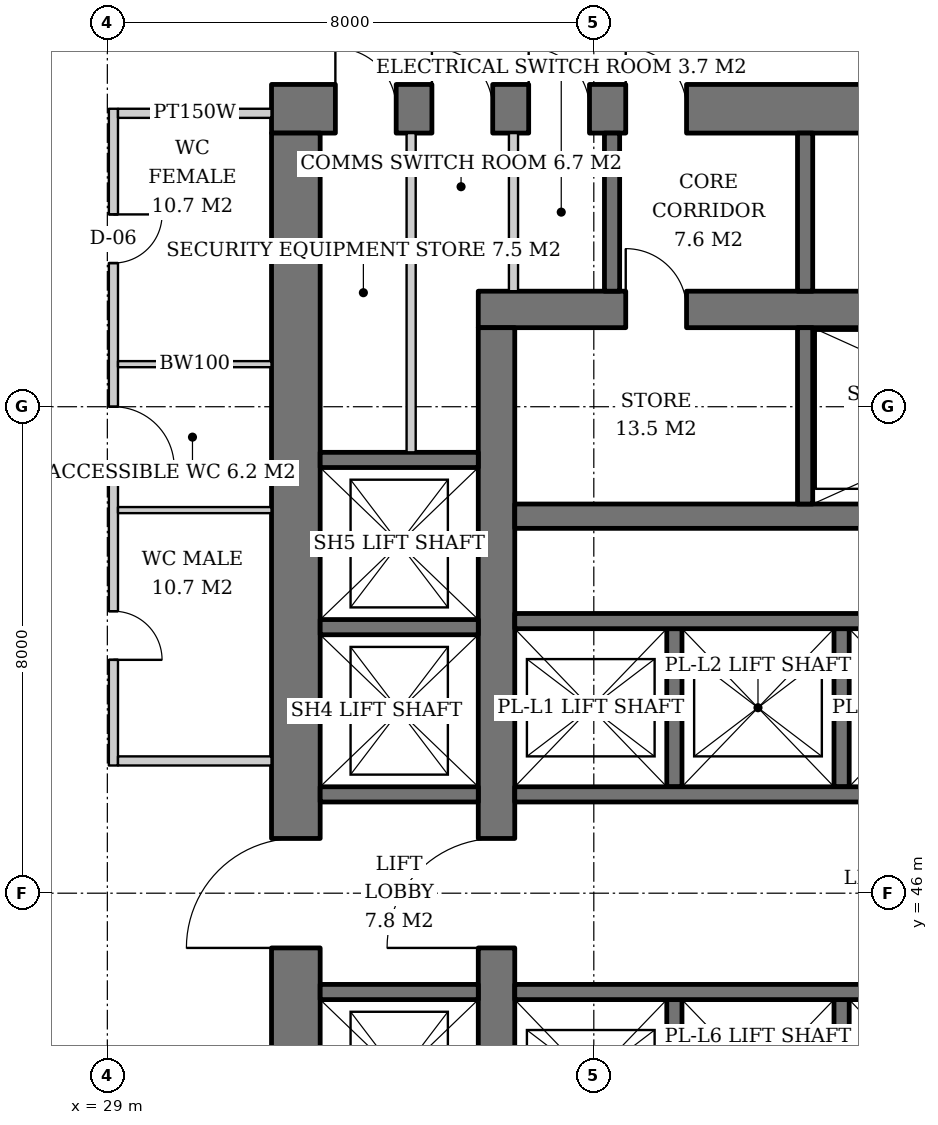
"""IFC4 building model, lengths in metres.
Left out: names, types, materials, properties, quantities, classifications, styles, units other than length and angle.
Written with IfcOpenShell. Run it as: python <this file> out.ifc"""

import sys

from ifc_helpers import new_model, si_unit, direction, frame, frame_2d, origin, place, context, subcontext, project, spatial, rectangle, extrude, element, fill, save


model = new_model("IFC4")
c1 = context("Model", 3, precision=1e-05, world=origin(), true_north=direction((0.0, 1.0)))
c2 = subcontext(c1, "Body", "Model", "MODEL_VIEW")
j1 = project(units=[si_unit("LENGTHUNIT", "METRE"), si_unit("PLANEANGLEUNIT", "RADIAN")], contexts=[c1])
p1 = place(None, origin())
s1 = spatial("IfcSite", under=j1, at=p1, CompositionType="ELEMENT")
p2 = place(p1, origin())
s2 = spatial("IfcBuilding", under=s1, at=p2, CompositionType="ELEMENT")
p3 = place(p2, frame((0.0, 0.0, 16.0)))
s3 = spatial("IfcBuildingStorey", under=s2, at=p3, CompositionType="ELEMENT", Elevation=16.0)
p4 = place(p3, frame((35.1, 55.6, 0.0), z_axis=(0.0, 0.0, 1.0), x_axis=(1.0, 0.0, 0.0)))
e1 = element("IfcWall", 1, at=p4, inside=s3, PredefinedType="SHEAR", context=c2, shape_type="SweptSolid", body=[
    extrude(rectangle(XDim=19.8, YDim=0.6, at=frame_2d((9.9, 0.0))), origin(), (0.0, 0.0, 1.0), 5.0),
])
p5 = place(p4, frame((14.54, 0.0, 0.0)))
e2 = element("IfcOpeningElement", 2, at=p5, cuts=e1, PredefinedType="OPENING", context=c2, shape_type="SweptSolid", body=[
    extrude(rectangle(XDim=1.0, YDim=2.1, at=frame_2d((0.5, 1.05))), frame((0.0, 0.31, 0.0), z_axis=(0.0, -1.0, 0.0), x_axis=(1.0, 0.0, 0.0)), (0.0, 0.0, 1.0), 0.62),
])
p6 = place(p4, frame((12.18, 0.0, 0.0)))
e3 = element("IfcOpeningElement", 3, at=p6, cuts=e1, PredefinedType="OPENING", context=c2, shape_type="SweptSolid", body=[
    extrude(rectangle(XDim=1.0, YDim=2.1, at=frame_2d((0.5, 1.05))), frame((0.0, 0.31, 0.0), z_axis=(0.0, -1.0, 0.0), x_axis=(1.0, 0.0, 0.0)), (0.0, 0.0, 1.0), 0.62),
])
p7 = place(p4, frame((2.425, 0.0, 0.0)))
e4 = element("IfcOpeningElement", 4, at=p7, cuts=e1, PredefinedType="OPENING", context=c2, shape_type="SweptSolid", body=[
    extrude(rectangle(XDim=1.0, YDim=2.1, at=frame_2d((0.5, 1.05))), frame((0.0, 0.31, 0.0), z_axis=(0.0, -1.0, 0.0), x_axis=(1.0, 0.0, 0.0)), (0.0, 0.0, 1.0), 0.62),
])
p8 = place(p3, frame((35.4, 36.7, 0.0), z_axis=(0.0, 0.0, 1.0), x_axis=(0.0, 1.0, 0.0)))
e5 = element("IfcWall", 5, at=p8, inside=s3, PredefinedType="SHEAR", context=c2, shape_type="SweptSolid", body=[
    extrude(rectangle(XDim=18.6, YDim=0.6, at=frame_2d((9.3, 0.0))), origin(), (0.0, 0.0, 1.0), 5.0),
])
p9 = place(p8, frame((8.4, 0.0, 0.0)))
e6 = element("IfcOpeningElement", 6, at=p9, cuts=e5, PredefinedType="OPENING", context=c2, shape_type="SweptSolid", body=[
    extrude(rectangle(XDim=1.8, YDim=2.4, at=frame_2d((0.9, 1.2))), frame((0.0, 0.31, 0.0), z_axis=(0.0, -1.0, 0.0), x_axis=(1.0, 0.0, 0.0)), (0.0, 0.0, 1.0), 0.62),
])
p10 = place(p3, frame((31.7, 58.9, 0.0), z_axis=(0.0, 0.0, 1.0), x_axis=(1.0, 0.0, 0.0)))
e7 = element("IfcWall", 7, at=p10, inside=s3, PredefinedType="SHEAR", context=c2, shape_type="SweptSolid", body=[
    extrude(rectangle(XDim=26.6, YDim=0.8, at=frame_2d((13.3, 0.0))), origin(), (0.0, 0.0, 1.0), 5.0),
])
p11 = place(p10, frame((17.94, 0.0, 0.0)))
e8 = element("IfcOpeningElement", 8, at=p11, cuts=e7, PredefinedType="OPENING", context=c2, shape_type="SweptSolid", body=[
    extrude(rectangle(XDim=1.0, YDim=2.1, at=frame_2d((0.5, 1.05))), frame((0.0, 0.41, 0.0), z_axis=(0.0, -1.0, 0.0), x_axis=(1.0, 0.0, 0.0)), (0.0, 0.0, 1.0), 0.82),
])
p12 = place(p10, frame((12.44, 0.0, 0.0)))
e9 = element("IfcOpeningElement", 9, at=p12, cuts=e7, PredefinedType="OPENING", context=c2, shape_type="SweptSolid", body=[
    extrude(rectangle(XDim=1.0, YDim=2.1, at=frame_2d((0.5, 1.05))), frame((0.0, 0.41, 0.0), z_axis=(0.0, -1.0, 0.0), x_axis=(1.0, 0.0, 0.0)), (0.0, 0.0, 1.0), 0.82),
])
p13 = place(p10, frame((5.825, 0.0, 0.0)))
e10 = element("IfcOpeningElement", 10, at=p13, cuts=e7, PredefinedType="OPENING", context=c2, shape_type="SweptSolid", body=[
    extrude(rectangle(XDim=1.0, YDim=2.1, at=frame_2d((0.5, 1.05))), frame((0.0, 0.41, 0.0), z_axis=(0.0, -1.0, 0.0), x_axis=(1.0, 0.0, 0.0)), (0.0, 0.0, 1.0), 0.82),
])
p14 = place(p10, frame((1.05, 0.0, 0.0)))
e11 = element("IfcOpeningElement", 11, at=p14, cuts=e7, PredefinedType="OPENING", context=c2, shape_type="SweptSolid", body=[
    extrude(rectangle(XDim=1.0, YDim=2.1, at=frame_2d((0.5, 1.05))), frame((0.0, 0.41, 0.0), z_axis=(0.0, -1.0, 0.0), x_axis=(1.0, 0.0, 0.0)), (0.0, 0.0, 1.0), 0.82),
])
p15 = place(p10, frame((2.637, 0.0, 0.0)))
e12 = element("IfcOpeningElement", 12, at=p15, cuts=e7, PredefinedType="OPENING", context=c2, shape_type="SweptSolid", body=[
    extrude(rectangle(XDim=1.0, YDim=2.1, at=frame_2d((0.5, 1.05))), frame((0.0, 0.41, 0.0), z_axis=(0.0, -1.0, 0.0), x_axis=(1.0, 0.0, 0.0)), (0.0, 0.0, 1.0), 0.82),
])
p16 = place(p10, frame((4.229, 0.0, 0.0)))
e13 = element("IfcOpeningElement", 13, at=p16, cuts=e7, PredefinedType="OPENING", context=c2, shape_type="SweptSolid", body=[
    extrude(rectangle(XDim=1.0, YDim=2.1, at=frame_2d((0.5, 1.05))), frame((0.0, 0.41, 0.0), z_axis=(0.0, -1.0, 0.0), x_axis=(1.0, 0.0, 0.0)), (0.0, 0.0, 1.0), 0.82),
])
p17 = place(p10, frame((20.875, 0.0, 0.0)))
e14 = element("IfcOpeningElement", 14, at=p17, cuts=e7, PredefinedType="OPENING", context=c2, shape_type="SweptSolid", body=[
    extrude(rectangle(XDim=1.0, YDim=2.1, at=frame_2d((0.5, 1.05))), frame((0.0, 0.41, 0.0), z_axis=(0.0, -1.0, 0.0), x_axis=(1.0, 0.0, 0.0)), (0.0, 0.0, 1.0), 0.82),
])
p18 = place(p10, frame((23.7, 0.0, 0.0)))
e15 = element("IfcOpeningElement", 15, at=p18, cuts=e7, PredefinedType="OPENING", context=c2, shape_type="SweptSolid", body=[
    extrude(rectangle(XDim=1.0, YDim=2.1, at=frame_2d((0.5, 1.05))), frame((0.0, 0.41, 0.0), z_axis=(0.0, -1.0, 0.0), x_axis=(1.0, 0.0, 0.0)), (0.0, 0.0, 1.0), 0.82),
])
p19 = place(p3, frame((32.1, 33.5, 0.0), z_axis=(0.0, 0.0, 1.0), x_axis=(0.0, 1.0, 0.0)))
e16 = element("IfcWall", 16, at=p19, inside=s3, PredefinedType="SHEAR", context=c2, shape_type="SweptSolid", body=[
    extrude(rectangle(XDim=25.0, YDim=0.8, at=frame_2d((12.5, 0.0))), origin(), (0.0, 0.0, 1.0), 5.0),
])
p20 = place(p19, frame((11.6, 0.0, 0.0)))
e17 = element("IfcOpeningElement", 17, at=p20, cuts=e16, PredefinedType="OPENING", context=c2, shape_type="SweptSolid", body=[
    extrude(rectangle(XDim=1.8, YDim=2.4, at=frame_2d((0.9, 1.2))), frame((0.0, 0.41, 0.0), z_axis=(0.0, -1.0, 0.0), x_axis=(1.0, 0.0, 0.0)), (0.0, 0.0, 1.0), 0.82),
])
p21 = place(p3, frame((35.7, 52.2, 0.0), z_axis=(0.0, 0.0, 1.0), x_axis=(1.0, 0.0, 0.0)))
e18 = element("IfcWall", 18, at=p21, inside=s3, PredefinedType="SHEAR", context=c2, shape_type="SweptSolid", body=[
    extrude(rectangle(XDim=18.6, YDim=0.4, at=frame_2d((9.3, 0.0))), origin(), (0.0, 0.0, 1.0), 5.0),
])
p22 = place(p3, frame((40.475, 52.4, 0.0), z_axis=(0.0, 0.0, 1.0), x_axis=(0.0, 1.0, 0.0)))
e19 = element("IfcWall", 19, at=p22, inside=s3, PredefinedType="SHEAR", context=c2, shape_type="SweptSolid", body=[
    extrude(rectangle(XDim=2.9, YDim=0.25, at=frame_2d((1.45, 0.0))), origin(), (0.0, 0.0, 1.0), 5.0),
])
for number, where, z_axis, x_axis in (
    (20, (38.325, 47.75, 0.0), (0.0, 0.0, 1.0), (0.0, 1.0, 0.0)),
    (21, (41.075, 47.75, 0.0), (0.0, 0.0, 1.0), (0.0, 1.0, 0.0)),
):
    element("IfcWall", number, at=place(p3, frame(where, z_axis=z_axis, x_axis=x_axis)), inside=s3, PredefinedType="SHEAR", context=c2, shape_type="SweptSolid", body=[
        extrude(rectangle(XDim=2.6, YDim=0.25, at=frame_2d((1.3, 0.0))), origin(), (0.0, 0.0, 1.0), 5.0),
    ])
p23 = place(p3, frame((35.7, 50.475, 0.0), z_axis=(0.0, 0.0, 1.0), x_axis=(1.0, 0.0, 0.0)))
e22 = element("IfcWall", 22, at=p23, inside=s3, PredefinedType="SHEAR", context=c2, shape_type="SweptSolid", body=[
    extrude(rectangle(XDim=11.0, YDim=0.25, at=frame_2d((5.5, 0.0))), origin(), (0.0, 0.0, 1.0), 5.0),
])
p24 = place(p3, frame((35.7, 47.625, 0.0), z_axis=(0.0, 0.0, 1.0), x_axis=(1.0, 0.0, 0.0)))
e23 = element("IfcWall", 23, at=p24, inside=s3, PredefinedType="SHEAR", context=c2, shape_type="SweptSolid", body=[
    extrude(rectangle(XDim=12.83, YDim=0.25, at=frame_2d((6.415, 0.0))), origin(), (0.0, 0.0, 1.0), 5.0),
])
p25 = place(p24, frame((11.515, 0.0, 0.0)))
e24 = element("IfcOpeningElement", 24, at=p25, cuts=e23, PredefinedType="OPENING", context=c2, shape_type="SweptSolid", body=[
    extrude(rectangle(XDim=0.8, YDim=2.0, at=frame_2d((0.4, 1.0))), frame((0.0, 0.135, 0.0), z_axis=(0.0, -1.0, 0.0), x_axis=(1.0, 0.0, 0.0)), (0.0, 0.0, 1.0), 0.27),
])
for number, where, z_axis, x_axis in (
    (25, (38.325, 44.25, 0.0), (0.0, 0.0, 1.0), (0.0, -1.0, 0.0)),
    (26, (41.075, 44.25, 0.0), (0.0, 0.0, 1.0), (0.0, -1.0, 0.0)),
):
    element("IfcWall", number, at=place(p3, frame(where, z_axis=z_axis, x_axis=x_axis)), inside=s3, PredefinedType="SHEAR", context=c2, shape_type="SweptSolid", body=[
        extrude(rectangle(XDim=2.6, YDim=0.25, at=frame_2d((1.3, 0.0))), origin(), (0.0, 0.0, 1.0), 5.0),
    ])
p26 = place(p3, frame((35.7, 44.375, 0.0), z_axis=(0.0, 0.0, 1.0), x_axis=(1.0, 0.0, 0.0)))
e27 = element("IfcWall", 27, at=p26, inside=s3, PredefinedType="SHEAR", context=c2, shape_type="SweptSolid", body=[
    extrude(rectangle(XDim=12.83, YDim=0.25, at=frame_2d((6.415, 0.0))), origin(), (0.0, 0.0, 1.0), 5.0),
])
p27 = place(p26, frame((11.515, 0.0, 0.0)))
e28 = element("IfcOpeningElement", 28, at=p27, cuts=e27, PredefinedType="OPENING", context=c2, shape_type="SweptSolid", body=[
    extrude(rectangle(XDim=0.8, YDim=2.0, at=frame_2d((0.4, 1.0))), frame((0.0, 0.135, 0.0), z_axis=(0.0, -1.0, 0.0), x_axis=(1.0, 0.0, 0.0)), (0.0, 0.0, 1.0), 0.27),
])
for number, where, z_axis, x_axis in (
    (29, (32.5, 44.375, 0.0), (0.0, 0.0, 1.0), (1.0, 0.0, 0.0)),
    (30, (32.5, 47.625, 0.0), (0.0, 0.0, 1.0), (1.0, 0.0, 0.0)),
    (31, (32.5, 50.375, 0.0), (0.0, 0.0, 1.0), (1.0, 0.0, 0.0)),
    (32, (32.5, 53.125, 0.0), (0.0, 0.0, 1.0), (1.0, 0.0, 0.0)),
):
    element("IfcWall", number, at=place(p3, frame(where, z_axis=z_axis, x_axis=x_axis)), inside=s3, PredefinedType="SHEAR", context=c2, shape_type="SweptSolid", body=[
        extrude(rectangle(XDim=2.6, YDim=0.25, at=frame_2d((1.3, 0.0))), origin(), (0.0, 0.0, 1.0), 5.0),
    ])
for number, where, z_axis, x_axis in (
    (33, (40.475, 55.9, 0.0), (0.0, 0.0, 1.0), (0.0, 1.0, 0.0)),
    (34, (37.3, 55.9, 0.0), (0.0, 0.0, 1.0), (0.0, 1.0, 0.0)),
):
    element("IfcWall", number, at=place(p3, frame(where, z_axis=z_axis, x_axis=x_axis)), inside=s3, PredefinedType="SOLIDWALL", context=c2, shape_type="SweptSolid", body=[
        extrude(rectangle(XDim=2.6, YDim=0.25, at=frame_2d((1.3, 0.0))), origin(), (0.0, 0.0, 1.0), 4.7),
    ])
p28 = place(p3, frame((33.996, 53.25, 0.0), z_axis=(0.0, 0.0, 1.0), x_axis=(0.0, 1.0, 0.0)))
e35 = element("IfcWall", 35, at=p28, inside=s3, PredefinedType="SOLIDWALL", context=c2, shape_type="SweptSolid", body=[
    extrude(rectangle(XDim=5.25, YDim=0.15, at=frame_2d((2.625, 0.0))), origin(), (0.0, 0.0, 1.0), 4.7),
])
p29 = place(p3, frame((35.679, 55.9, 0.0), z_axis=(0.0, 0.0, 1.0), x_axis=(0.0, 1.0, 0.0)))
e36 = element("IfcWall", 36, at=p29, inside=s3, PredefinedType="SOLIDWALL", context=c2, shape_type="SweptSolid", body=[
    extrude(rectangle(XDim=2.6, YDim=0.15, at=frame_2d((1.3, 0.0))), origin(), (0.0, 0.0, 1.0), 4.7),
])
p30 = place(p3, frame((29.1, 58.9, 0.0), z_axis=(0.0, 0.0, 1.0), x_axis=(0.0, -1.0, 0.0)))
e37 = element("IfcWall", 37, at=p30, inside=s3, PredefinedType="PARTITIONING", context=c2, shape_type="SweptSolid", body=[
    extrude(rectangle(XDim=10.8, YDim=0.15, at=frame_2d((5.4, 0.0))), origin(), (0.0, 0.0, 1.0), 3.688),
])
p31 = place(p30, frame((1.738, 0.0, 0.0)))
e38 = element("IfcOpeningElement", 38, at=p31, cuts=e37, PredefinedType="OPENING", context=c2, shape_type="SweptSolid", body=[
    extrude(rectangle(XDim=0.8, YDim=2.1, at=frame_2d((0.4, 1.05))), frame((0.0, 0.085, 0.0), z_axis=(0.0, -1.0, 0.0), x_axis=(1.0, 0.0, 0.0)), (0.0, 0.0, 1.0), 0.17),
])
p32 = place(p30, frame((4.9, 0.0, 0.0)))
e39 = element("IfcOpeningElement", 39, at=p32, cuts=e37, PredefinedType="OPENING", context=c2, shape_type="SweptSolid", body=[
    extrude(rectangle(XDim=1.0, YDim=2.1, at=frame_2d((0.5, 1.05))), frame((0.0, 0.085, 0.0), z_axis=(0.0, -1.0, 0.0), x_axis=(1.0, 0.0, 0.0)), (0.0, 0.0, 1.0), 0.17),
])
p33 = place(p30, frame((8.262, 0.0, 0.0)))
e40 = element("IfcOpeningElement", 40, at=p33, cuts=e37, PredefinedType="OPENING", context=c2, shape_type="SweptSolid", body=[
    extrude(rectangle(XDim=0.8, YDim=2.1, at=frame_2d((0.4, 1.05))), frame((0.0, 0.085, 0.0), z_axis=(0.0, -1.0, 0.0), x_axis=(1.0, 0.0, 0.0)), (0.0, 0.0, 1.0), 0.17),
])
p34 = place(p3, frame((29.175, 58.825, 0.0), z_axis=(0.0, 0.0, 1.0), x_axis=(1.0, 0.0, 0.0)))
e41 = element("IfcWall", 41, at=p34, inside=s3, PredefinedType="PARTITIONING", context=c2, shape_type="SweptSolid", body=[
    extrude(rectangle(XDim=2.525, YDim=0.15, at=frame_2d((1.262, 0.0))), origin(), (0.0, 0.0, 1.0), 3.688),
])
p35 = place(p3, frame((29.175, 54.7, 0.0), z_axis=(0.0, 0.0, 1.0), x_axis=(1.0, 0.0, 0.0)))
e42 = element("IfcWall", 42, at=p35, inside=s3, PredefinedType="SOLIDWALL", context=c2, shape_type="SweptSolid", body=[
    extrude(rectangle(XDim=2.525, YDim=0.1, at=frame_2d((1.262, 0.0))), origin(), (0.0, 0.0, 1.0), 3.93),
])
p36 = place(p3, frame((29.175, 52.3, 0.0), z_axis=(0.0, 0.0, 1.0), x_axis=(1.0, 0.0, 0.0)))
e43 = element("IfcWall", 43, at=p36, inside=s3, PredefinedType="SOLIDWALL", context=c2, shape_type="SweptSolid", body=[
    extrude(rectangle(XDim=2.525, YDim=0.1, at=frame_2d((1.262, 0.0))), origin(), (0.0, 0.0, 1.0), 4.7),
])
p37 = place(p3, frame((29.175, 48.175, 0.0), z_axis=(0.0, 0.0, 1.0), x_axis=(1.0, 0.0, 0.0)))
e44 = element("IfcWall", 44, at=p37, inside=s3, PredefinedType="PARTITIONING", context=c2, shape_type="SweptSolid", body=[
    extrude(rectangle(XDim=2.525, YDim=0.15, at=frame_2d((1.262, 0.0))), origin(), (0.0, 0.0, 1.0), 4.7),
])
p38 = place(p9, origin())
e45 = element("IfcDoor", 45, at=p38, inside=s3, OperationType="DOUBLE_DOOR_SINGLE_SWING", PredefinedType="DOOR", context=c2, shape_type="SweptSolid", body=[
    extrude(rectangle(XDim=1.8, YDim=2.4, at=frame_2d((0.9, 1.2))), frame((0.0, 0.025, 0.0), z_axis=(0.0, -1.0, 0.0), x_axis=(1.0, 0.0, 0.0)), (0.0, 0.0, 1.0), 0.05),
])
fill(e6, e45)
p39 = place(p20, origin())
e46 = element("IfcDoor", 46, at=p39, inside=s3, OperationType="DOUBLE_DOOR_SINGLE_SWING", PredefinedType="DOOR", context=c2, shape_type="SweptSolid", body=[
    extrude(rectangle(XDim=1.8, YDim=2.4, at=frame_2d((0.9, 1.2))), frame((0.0, 0.025, 0.0), z_axis=(0.0, -1.0, 0.0), x_axis=(1.0, 0.0, 0.0)), (0.0, 0.0, 1.0), 0.05),
])
fill(e17, e46)
p40 = place(p13, origin())
e47 = element("IfcDoor", 47, at=p40, inside=s3, OperationType="SINGLE_SWING_LEFT", PredefinedType="DOOR", context=c2, shape_type="SweptSolid", body=[
    extrude(rectangle(XDim=1.0, YDim=2.1, at=frame_2d((0.5, 1.05))), frame((0.0, 0.025, 0.0), z_axis=(0.0, -1.0, 0.0), x_axis=(1.0, 0.0, 0.0)), (0.0, 0.0, 1.0), 0.05),
])
fill(e10, e47)
p41 = place(p7, origin())
e48 = element("IfcDoor", 48, at=p41, inside=s3, OperationType="SINGLE_SWING_LEFT", PredefinedType="DOOR", context=c2, shape_type="SweptSolid", body=[
    extrude(rectangle(XDim=1.0, YDim=2.1, at=frame_2d((0.5, 1.05))), frame((0.0, -0.24, 0.0), z_axis=(0.0, -1.0, 0.0), x_axis=(1.0, 0.0, 0.0)), (0.0, 0.0, 1.0), 0.05),
])
fill(e4, e48)
p42 = place(p14, origin())
e49 = element("IfcDoor", 49, at=p42, inside=s3, OperationType="SINGLE_SWING_LEFT", PredefinedType="DOOR", context=c2, shape_type="SweptSolid", body=[
    extrude(rectangle(XDim=1.0, YDim=2.1, at=frame_2d((0.5, 1.05))), frame((0.0, -0.34, 0.0), z_axis=(0.0, -1.0, 0.0), x_axis=(1.0, 0.0, 0.0)), (0.0, 0.0, 1.0), 0.05),
])
fill(e11, e49)
p43 = place(p15, origin())
e50 = element("IfcDoor", 50, at=p43, inside=s3, OperationType="SINGLE_SWING_LEFT", PredefinedType="DOOR", context=c2, shape_type="SweptSolid", body=[
    extrude(rectangle(XDim=1.0, YDim=2.1, at=frame_2d((0.5, 1.05))), frame((0.0, -0.34, 0.0), z_axis=(0.0, -1.0, 0.0), x_axis=(1.0, 0.0, 0.0)), (0.0, 0.0, 1.0), 0.05),
])
fill(e12, e50)
p44 = place(p16, origin())
e51 = element("IfcDoor", 51, at=p44, inside=s3, OperationType="SINGLE_SWING_LEFT", PredefinedType="DOOR", context=c2, shape_type="SweptSolid", body=[
    extrude(rectangle(XDim=1.0, YDim=2.1, at=frame_2d((0.5, 1.05))), frame((0.0, -0.34, 0.0), z_axis=(0.0, -1.0, 0.0), x_axis=(1.0, 0.0, 0.0)), (0.0, 0.0, 1.0), 0.05),
])
fill(e13, e51)
p45 = place(p31, origin())
e52 = element("IfcDoor", 52, at=p45, inside=s3, OperationType="SINGLE_SWING_LEFT", PredefinedType="DOOR", context=c2, shape_type="SweptSolid", body=[
    extrude(rectangle(XDim=0.8, YDim=2.1, at=frame_2d((0.4, 1.05))), frame((0.0, 0.025, 0.0), z_axis=(0.0, -1.0, 0.0), x_axis=(1.0, 0.0, 0.0)), (0.0, 0.0, 1.0), 0.05),
])
fill(e38, e52)
p46 = place(p32, origin())
e53 = element("IfcDoor", 53, at=p46, inside=s3, OperationType="SINGLE_SWING_RIGHT", PredefinedType="DOOR", context=c2, shape_type="SweptSolid", body=[
    extrude(rectangle(XDim=1.0, YDim=2.1, at=frame_2d((0.5, 1.05))), frame((0.0, 0.025, 0.0), z_axis=(0.0, -1.0, 0.0), x_axis=(1.0, 0.0, 0.0)), (0.0, 0.0, 1.0), 0.05),
])
fill(e39, e53)
p47 = place(p33, origin())
e54 = element("IfcDoor", 54, at=p47, inside=s3, OperationType="SINGLE_SWING_RIGHT", PredefinedType="DOOR", context=c2, shape_type="SweptSolid", body=[
    extrude(rectangle(XDim=0.8, YDim=2.1, at=frame_2d((0.4, 1.05))), frame((0.0, 0.025, 0.0), z_axis=(0.0, -1.0, 0.0), x_axis=(1.0, 0.0, 0.0)), (0.0, 0.0, 1.0), 0.05),
])
fill(e40, e54)
save(model, sys.argv[1])
